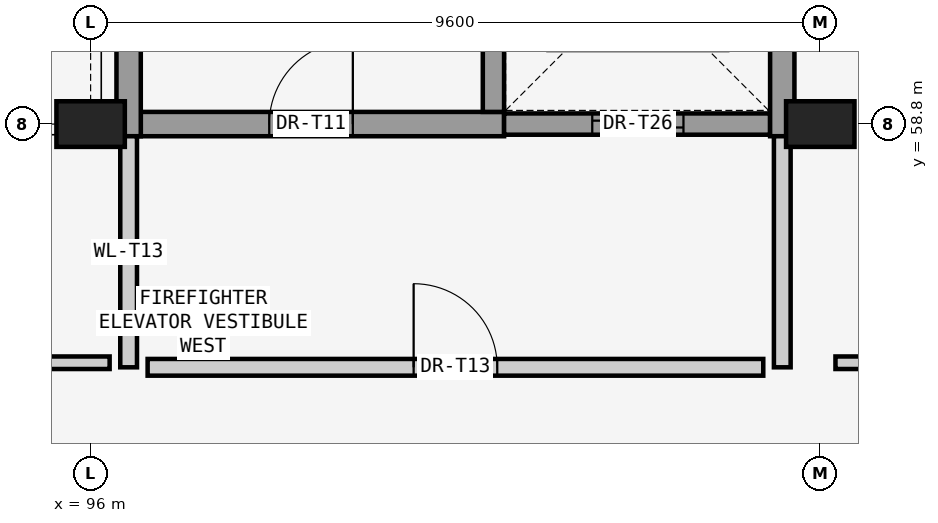
"""IFC4 building model, lengths in metres.
Left out: names, types, materials, properties, quantities, classifications, styles, units other than length and angle.
Written with IfcOpenShell. Run it as: python <this file> out.ifc"""

import sys

from ifc_helpers import new_model, si_unit, direction, frame, frame_2d, origin, origin_2d, place, context, subcontext, project, spatial, rectangle, extrude, element, fill, save


model = new_model("IFC4")
c1 = context("Model", 3, precision=1e-05, world=origin(), true_north=direction((0.0, 1.0)))
c2 = subcontext(c1, "Body", "Model", "MODEL_VIEW")
j1 = project(units=[si_unit("LENGTHUNIT", "METRE"), si_unit("PLANEANGLEUNIT", "RADIAN")], contexts=[c1])
p1 = place(None, origin())
s1 = spatial("IfcSite", under=j1, at=p1, CompositionType="ELEMENT")
p2 = place(p1, origin())
s2 = spatial("IfcBuilding", under=s1, at=p2, CompositionType="ELEMENT")
p3 = place(p2, frame((0.0, 0.0, -4.8)))
s3 = spatial("IfcBuildingStorey", under=s2, at=p3, CompositionType="ELEMENT", Elevation=-4.8)
for number, where, z_axis, x_axis in (
    (1, (96.0, 58.8, 0.0), (0.0, 0.0, 1.0), (1.0, 0.0, 0.0)),
    (2, (105.6, 58.8, 0.0), (0.0, 0.0, 1.0), (1.0, 0.0, 0.0)),
):
    element("IfcColumn", number, at=place(p3, frame(where, z_axis=z_axis, x_axis=x_axis)), inside=s3, PredefinedType="COLUMN", context=c2, shape_type="SweptSolid", body=[
        extrude(rectangle(XDim=0.9, YDim=0.6, at=origin_2d()), origin(), (0.0, 0.0, 1.0), 4.38),
    ])
p4 = place(p3, frame((96.66, 58.8, 0.0), z_axis=(0.0, 0.0, 1.0), x_axis=(1.0, 0.0, 0.0)))
e3 = element("IfcWall", 3, at=p4, inside=s3, PredefinedType="SHEAR", context=c2, shape_type="SweptSolid", body=[
    extrude(rectangle(XDim=4.78, YDim=0.32, at=frame_2d((2.39, 0.0))), origin(), (0.0, 0.0, 1.0), 4.44),
])
p5 = place(p4, frame((1.69, 0.0, 0.0)))
e4 = element("IfcOpeningElement", 4, at=p5, cuts=e3, PredefinedType="OPENING", context=c2, shape_type="SweptSolid", body=[
    extrude(rectangle(XDim=1.1, YDim=2.2, at=frame_2d((0.55, 1.1))), frame((0.0, 0.17, 0.0), z_axis=(0.0, -1.0, 0.0), x_axis=(1.0, 0.0, 0.0)), (0.0, 0.0, 1.0), 0.34),
])
p6 = place(p3, frame((101.44, 58.8, 0.0), z_axis=(0.0, 0.0, 1.0), x_axis=(1.0, 0.0, 0.0)))
e5 = element("IfcWall", 5, at=p6, inside=s3, PredefinedType="SHEAR", context=c2, shape_type="SweptSolid", body=[
    extrude(rectangle(XDim=3.5, YDim=0.28, at=frame_2d((1.75, 0.0))), origin(), (0.0, 0.0, 1.0), 4.44),
])
p7 = place(p6, frame((1.16, 0.0, 0.0)))
e6 = element("IfcOpeningElement", 6, at=p7, cuts=e5, PredefinedType="OPENING", context=c2, shape_type="SweptSolid", body=[
    extrude(rectangle(XDim=1.2, YDim=2.2, at=frame_2d((0.6, 1.1))), frame((0.0, 0.15, 0.0), z_axis=(0.0, -1.0, 0.0), x_axis=(1.0, 0.0, 0.0)), (0.0, 0.0, 1.0), 0.3),
])
for number, where, z_axis, x_axis in (
    (7, (96.5, 67.0, 0.0), (0.0, 0.0, 1.0), (0.0, -1.0, 0.0)),
    (8, (105.1, 58.64, 0.0), (0.0, 0.0, 1.0), (0.0, 1.0, 0.0)),
):
    element("IfcWall", number, at=place(p3, frame(where, z_axis=z_axis, x_axis=x_axis)), inside=s3, PredefinedType="SHEAR", context=c2, shape_type="SweptSolid", body=[
        extrude(rectangle(XDim=8.36, YDim=0.32, at=frame_2d((4.18, 0.0))), origin(), (0.0, 0.0, 1.0), 4.44),
    ])
p8 = place(p3, frame((101.3, 58.96, 0.0), z_axis=(0.0, 0.0, 1.0), x_axis=(0.0, 1.0, 0.0)))
e9 = element("IfcWall", 9, at=p8, inside=s3, PredefinedType="SHEAR", context=c2, shape_type="SweptSolid", body=[
    extrude(rectangle(XDim=7.72, YDim=0.28, at=frame_2d((3.86, 0.0))), origin(), (0.0, 0.0, 1.0), 4.44),
])
for number, where, z_axis, x_axis in (
    (10, (96.5, 55.6, 0.0), (0.0, 0.0, 1.0), (0.0, 1.0, 0.0)),
    (11, (105.1, 55.6, 0.0), (0.0, 0.0, 1.0), (0.0, 1.0, 0.0)),
):
    element("IfcWall", number, at=place(p3, frame(where, z_axis=z_axis, x_axis=x_axis)), inside=s3, PredefinedType="SOLIDWALL", context=c2, shape_type="SweptSolid", body=[
        extrude(rectangle(XDim=3.04, YDim=0.22, at=frame_2d((1.52, 0.0))), origin(), (0.0, 0.0, 1.0), 4.32),
    ])
p9 = place(p3, frame((96.75, 55.6, 0.0), z_axis=(0.0, 0.0, 1.0), x_axis=(1.0, 0.0, 0.0)))
e12 = element("IfcWall", 12, at=p9, inside=s3, PredefinedType="SOLIDWALL", context=c2, shape_type="SweptSolid", body=[
    extrude(rectangle(XDim=8.1, YDim=0.22, at=frame_2d((4.05, 0.0))), origin(), (0.0, 0.0, 1.0), 4.32),
])
p10 = place(p9, frame((3.5, 0.0, 0.0)))
e13 = element("IfcOpeningElement", 13, at=p10, cuts=e12, PredefinedType="OPENING", context=c2, shape_type="SweptSolid", body=[
    extrude(rectangle(XDim=1.1, YDim=2.2, at=frame_2d((0.55, 1.1))), frame((0.0, 0.12, 0.0), z_axis=(0.0, -1.0, 0.0), x_axis=(1.0, 0.0, 0.0)), (0.0, 0.0, 1.0), 0.24),
])
p11 = place(p3, frame((67.4, 55.66, 0.0), z_axis=(0.0, 0.0, 1.0), x_axis=(1.0, 0.0, 0.0)))
e14 = element("IfcWall", 14, at=p11, inside=s3, PredefinedType="PARTITIONING", context=c2, shape_type="SweptSolid", body=[
    extrude(rectangle(XDim=28.85, YDim=0.165, at=frame_2d((14.425, 0.0))), origin(), (0.0, 0.0, 1.0), 4.33),
])
p12 = place(p11, frame((13.95, 0.0, 0.0)))
e15 = element("IfcOpeningElement", 15, at=p12, cuts=e14, PredefinedType="OPENING", context=c2, shape_type="SweptSolid", body=[
    extrude(rectangle(XDim=0.95, YDim=2.15, at=frame_2d((0.475, 1.075))), frame((0.0, 0.093, 0.0), z_axis=(0.0, -1.0, 0.0), x_axis=(1.0, 0.0, 0.0)), (0.0, 0.0, 1.0), 0.185),
])
p13 = place(p3, frame((105.8, 55.66, 0.0), z_axis=(0.0, 0.0, 1.0), x_axis=(1.0, 0.0, 0.0)))
e16 = element("IfcWall", 16, at=p13, inside=s3, PredefinedType="PARTITIONING", context=c2, shape_type="SweptSolid", body=[
    extrude(rectangle(XDim=3.6, YDim=0.165, at=frame_2d((1.8, 0.0))), origin(), (0.0, 0.0, 1.0), 4.33),
])
p14 = place(p5, origin())
e17 = element("IfcDoor", 17, at=p14, inside=s3, OperationType="SINGLE_SWING_RIGHT", PredefinedType="DOOR", context=c2, shape_type="SweptSolid", body=[
    extrude(rectangle(XDim=1.1, YDim=2.2, at=frame_2d((0.55, 1.1))), frame((0.0, 0.025, 0.0), z_axis=(0.0, -1.0, 0.0), x_axis=(1.0, 0.0, 0.0)), (0.0, 0.0, 1.0), 0.05),
])
fill(e4, e17)
p15 = place(p7, origin())
e18 = element("IfcDoor", 18, at=p15, inside=s3, OperationType="SLIDING_TO_RIGHT", PredefinedType="DOOR", context=c2, shape_type="SweptSolid", body=[
    extrude(rectangle(XDim=1.2, YDim=2.2, at=frame_2d((0.6, 1.1))), frame((0.0, 0.025, 0.0), z_axis=(0.0, -1.0, 0.0), x_axis=(1.0, 0.0, 0.0)), (0.0, 0.0, 1.0), 0.05),
])
fill(e6, e18)
p16 = place(p10, origin())
e19 = element("IfcDoor", 19, at=p16, inside=s3, OperationType="SINGLE_SWING_LEFT", PredefinedType="DOOR", context=c2, shape_type="SweptSolid", body=[
    extrude(rectangle(XDim=1.1, YDim=2.2, at=frame_2d((0.55, 1.1))), frame((0.0, 0.025, 0.0), z_axis=(0.0, -1.0, 0.0), x_axis=(1.0, 0.0, 0.0)), (0.0, 0.0, 1.0), 0.05),
])
fill(e13, e19)
save(model, sys.argv[1])
